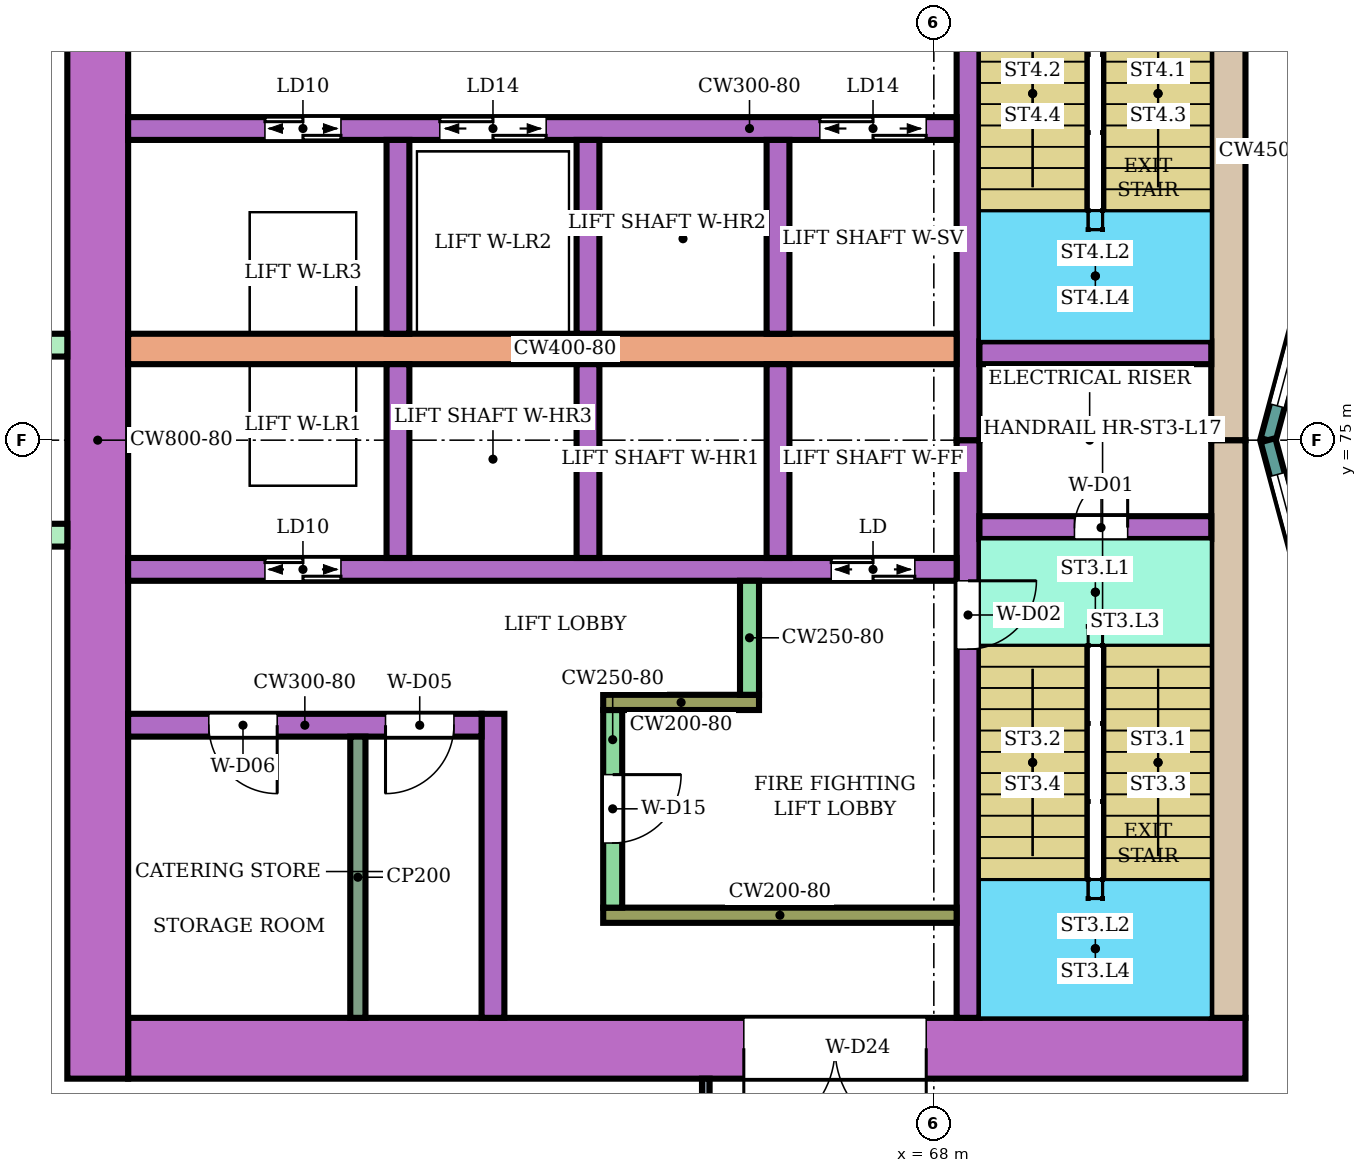
"""IFC4 building model, lengths in metres.
Left out: names, types, materials, properties, quantities, classifications, styles, units other than length and angle.
Written with IfcOpenShell. Run it as: python <this file> out.ifc"""

import sys

from ifc_helpers import new_model, si_unit, direction, frame, frame_2d, origin, place, context, subcontext, project, spatial, rectangle, extrude, element, fill, save


model = new_model("IFC4")
c1 = context("Model", 3, precision=1e-05, world=origin(), true_north=direction((0.0, 1.0)))
c2 = subcontext(c1, "Body", "Model", "MODEL_VIEW")
j1 = project(units=[si_unit("LENGTHUNIT", "METRE"), si_unit("PLANEANGLEUNIT", "RADIAN")], contexts=[c1])
p1 = place(None, origin())
s1 = spatial("IfcSite", under=j1, at=p1, CompositionType="ELEMENT")
p2 = place(p1, origin())
s2 = spatial("IfcBuilding", under=s1, at=p2, CompositionType="ELEMENT")
p3 = place(p2, frame((0.0, 0.0, 74.4)))
s3 = spatial("IfcBuildingStorey", under=s2, at=p3, CompositionType="ELEMENT", Elevation=74.4)
p4 = place(p3, frame((72.1, 67.0, 0.0), z_axis=(0.0, 0.0, 1.0), x_axis=(-1.0, 0.0, 0.0)))
e1 = element("IfcWall", 1, at=p4, inside=s3, PredefinedType="SHEAR", context=c2, shape_type="SweptSolid", body=[
    extrude(rectangle(XDim=14.7, YDim=0.8, at=frame_2d((7.35, 0.0))), origin(), (0.0, 0.0, 1.0), 7.68),
])
p5 = place(p4, frame((4.2, 0.0, 0.0)))
e2 = element("IfcOpeningElement", 2, at=p5, cuts=e1, PredefinedType="OPENING", context=c2, shape_type="SweptSolid", body=[
    extrude(rectangle(XDim=2.4, YDim=2.4, at=frame_2d((1.2, 1.2))), frame((0.0, 0.41, 0.0), z_axis=(0.0, -1.0, 0.0), x_axis=(1.0, 0.0, 0.0)), (0.0, 0.0, 1.0), 0.82),
])
for number, where, z_axis, x_axis in (
    (3, (71.875, 75.0, 0.0), (0.0, 0.0, 1.0), (0.0, -1.0, 0.0)),
    (4, (71.875, 82.6, 0.0), (0.0, 0.0, 1.0), (0.0, -1.0, 0.0)),
):
    element("IfcWall", number, at=place(p3, frame(where, z_axis=z_axis, x_axis=x_axis)), inside=s3, PredefinedType="SHEAR", context=c2, shape_type="SweptSolid", body=[
        extrude(rectangle(XDim=7.6, YDim=0.45, at=frame_2d((3.8, 0.0))), origin(), (0.0, 0.0, 1.0), 7.68),
    ])
p6 = place(p3, frame((57.0, 83.4, 0.0), z_axis=(0.0, 0.0, 1.0), x_axis=(0.0, -1.0, 0.0)))
e5 = element("IfcWall", 5, at=p6, inside=s3, PredefinedType="SHEAR", context=c2, shape_type="SweptSolid", body=[
    extrude(rectangle(XDim=16.8, YDim=0.8, at=frame_2d((8.4, 0.0))), origin(), (0.0, 0.0, 1.0), 7.68),
])
p7 = place(p3, frame((68.45, 75.0, 0.0), z_axis=(0.0, 0.0, 1.0), x_axis=(0.0, -1.0, 0.0)))
e6 = element("IfcWall", 6, at=p7, inside=s3, PredefinedType="SHEAR", context=c2, shape_type="SweptSolid", body=[
    extrude(rectangle(XDim=7.6, YDim=0.3, at=frame_2d((3.8, 0.0))), origin(), (0.0, 0.0, 1.0), 7.68),
])
p8 = place(p7, frame((1.85, 0.0, 0.0)))
e7 = element("IfcOpeningElement", 7, at=p8, cuts=e6, PredefinedType="OPENING", context=c2, shape_type="SweptSolid", body=[
    extrude(rectangle(XDim=0.9, YDim=2.1, at=frame_2d((0.45, 1.05))), frame((0.0, 0.16, 0.0), z_axis=(0.0, -1.0, 0.0), x_axis=(1.0, 0.0, 0.0)), (0.0, 0.0, 1.0), 0.32),
])
p9 = place(p3, frame((68.45, 82.6, 0.0), z_axis=(0.0, 0.0, 1.0), x_axis=(0.0, -1.0, 0.0)))
e8 = element("IfcWall", 8, at=p9, inside=s3, PredefinedType="SHEAR", context=c2, shape_type="SweptSolid", body=[
    extrude(rectangle(XDim=7.6, YDim=0.3, at=frame_2d((3.8, 0.0))), origin(), (0.0, 0.0, 1.0), 7.68),
])
p10 = place(p9, frame((0.25, 0.0, 0.0)))
e9 = element("IfcOpeningElement", 9, at=p10, cuts=e8, PredefinedType="OPENING", context=c2, shape_type="SweptSolid", body=[
    extrude(rectangle(XDim=0.9, YDim=2.1, at=frame_2d((0.45, 1.05))), frame((0.0, 0.16, 0.0), z_axis=(0.0, -1.0, 0.0), x_axis=(1.0, 0.0, 0.0)), (0.0, 0.0, 1.0), 0.32),
])
p11 = place(p3, frame((71.65, 73.85, 0.0), z_axis=(0.0, 0.0, 1.0), x_axis=(-1.0, 0.0, 0.0)))
e10 = element("IfcWall", 10, at=p11, inside=s3, PredefinedType="SHEAR", context=c2, shape_type="SweptSolid", body=[
    extrude(rectangle(XDim=3.05, YDim=0.3, at=frame_2d((1.525, 0.0))), origin(), (0.0, 0.0, 1.0), 7.68),
])
p12 = place(p11, frame((1.1, 0.0, 0.0)))
e11 = element("IfcOpeningElement", 11, at=p12, cuts=e10, PredefinedType="OPENING", context=c2, shape_type="SweptSolid", body=[
    extrude(rectangle(XDim=0.7, YDim=2.0, at=frame_2d((0.35, 1.0))), frame((0.0, 0.16, 0.0), z_axis=(0.0, -1.0, 0.0), x_axis=(1.0, 0.0, 0.0)), (0.0, 0.0, 1.0), 0.32),
])
p13 = place(p3, frame((71.65, 76.15, 0.0), z_axis=(0.0, 0.0, 1.0), x_axis=(-1.0, 0.0, 0.0)))
e12 = element("IfcWall", 12, at=p13, inside=s3, PredefinedType="SHEAR", context=c2, shape_type="SweptSolid", body=[
    extrude(rectangle(XDim=3.05, YDim=0.3, at=frame_2d((1.525, 0.0))), origin(), (0.0, 0.0, 1.0), 7.68),
])
p14 = place(p3, frame((68.3, 73.3, 0.0), z_axis=(0.0, 0.0, 1.0), x_axis=(-1.0, 0.0, 0.0)))
e13 = element("IfcWall", 13, at=p14, inside=s3, PredefinedType="SHEAR", context=c2, shape_type="SweptSolid", body=[
    extrude(rectangle(XDim=10.9, YDim=0.3, at=frame_2d((5.45, 0.0))), origin(), (0.0, 0.0, 1.0), 7.68),
])
p15 = place(p14, frame((0.55, 0.0, 0.0)))
e14 = element("IfcOpeningElement", 14, at=p15, cuts=e13, PredefinedType="OPENING", context=c2, shape_type="SweptSolid", body=[
    extrude(rectangle(XDim=1.1, YDim=2.1, at=frame_2d((0.55, 1.05))), frame((0.0, 0.16, 0.0), z_axis=(0.0, -1.0, 0.0), x_axis=(1.0, 0.0, 0.0)), (0.0, 0.0, 1.0), 0.32),
])
p16 = place(p14, frame((8.1, 0.0, 0.0)))
e15 = element("IfcOpeningElement", 15, at=p16, cuts=e13, PredefinedType="OPENING", context=c2, shape_type="SweptSolid", body=[
    extrude(rectangle(XDim=1.0, YDim=2.1, at=frame_2d((0.5, 1.05))), frame((0.0, 0.16, 0.0), z_axis=(0.0, -1.0, 0.0), x_axis=(1.0, 0.0, 0.0)), (0.0, 0.0, 1.0), 0.32),
])
p17 = place(p3, frame((68.3, 76.2, 0.0), z_axis=(0.0, 0.0, 1.0), x_axis=(-1.0, 0.0, 0.0)))
e16 = element("IfcWall", 16, at=p17, inside=s3, PredefinedType="SHEAR", context=c2, shape_type="SweptSolid", body=[
    extrude(rectangle(XDim=10.9, YDim=0.4, at=frame_2d((5.45, 0.0))), origin(), (0.0, 0.0, 1.0), 7.68),
])
p18 = place(p3, frame((68.3, 79.1, 0.0), z_axis=(0.0, 0.0, 1.0), x_axis=(-1.0, 0.0, 0.0)))
e17 = element("IfcWall", 17, at=p18, inside=s3, PredefinedType="SHEAR", context=c2, shape_type="SweptSolid", body=[
    extrude(rectangle(XDim=10.9, YDim=0.3, at=frame_2d((5.45, 0.0))), origin(), (0.0, 0.0, 1.0), 7.68),
])
p19 = place(p18, frame((0.4, 0.0, 0.0)))
e18 = element("IfcOpeningElement", 18, at=p19, cuts=e17, PredefinedType="OPENING", context=c2, shape_type="SweptSolid", body=[
    extrude(rectangle(XDim=1.4, YDim=2.1, at=frame_2d((0.7, 1.05))), frame((0.0, 0.16, 0.0), z_axis=(0.0, -1.0, 0.0), x_axis=(1.0, 0.0, 0.0)), (0.0, 0.0, 1.0), 0.32),
])
p20 = place(p18, frame((5.4, 0.0, 0.0)))
e19 = element("IfcOpeningElement", 19, at=p20, cuts=e17, PredefinedType="OPENING", context=c2, shape_type="SweptSolid", body=[
    extrude(rectangle(XDim=1.4, YDim=2.1, at=frame_2d((0.7, 1.05))), frame((0.0, 0.16, 0.0), z_axis=(0.0, -1.0, 0.0), x_axis=(1.0, 0.0, 0.0)), (0.0, 0.0, 1.0), 0.32),
])
p21 = place(p18, frame((8.1, 0.0, 0.0)))
e20 = element("IfcOpeningElement", 20, at=p21, cuts=e17, PredefinedType="OPENING", context=c2, shape_type="SweptSolid", body=[
    extrude(rectangle(XDim=1.0, YDim=2.1, at=frame_2d((0.5, 1.05))), frame((0.0, 0.16, 0.0), z_axis=(0.0, -1.0, 0.0), x_axis=(1.0, 0.0, 0.0)), (0.0, 0.0, 1.0), 0.32),
])
for number, where, z_axis, x_axis in (
    (21, (65.95, 76.0, 0.0), (0.0, 0.0, 1.0), (0.0, -1.0, 0.0)),
    (22, (63.45, 76.0, 0.0), (0.0, 0.0, 1.0), (0.0, -1.0, 0.0)),
    (23, (60.95, 76.0, 0.0), (0.0, 0.0, 1.0), (0.0, -1.0, 0.0)),
    (24, (65.95, 78.95, 0.0), (0.0, 0.0, 1.0), (0.0, -1.0, 0.0)),
    (25, (63.45, 78.95, 0.0), (0.0, 0.0, 1.0), (0.0, -1.0, 0.0)),
    (26, (60.95, 78.95, 0.0), (0.0, 0.0, 1.0), (0.0, -1.0, 0.0)),
):
    element("IfcWall", number, at=place(p3, frame(where, z_axis=z_axis, x_axis=x_axis)), inside=s3, PredefinedType="SHEAR", context=c2, shape_type="SweptSolid", body=[
        extrude(rectangle(XDim=2.55, YDim=0.3, at=frame_2d((1.275, 0.0))), origin(), (0.0, 0.0, 1.0), 7.68),
    ])
p22 = place(p3, frame((68.3, 68.75, 0.0), z_axis=(0.0, 0.0, 1.0), x_axis=(-1.0, 0.0, 0.0)))
e27 = element("IfcWall", 27, at=p22, inside=s3, PredefinedType="SHEAR", context=c2, shape_type="SweptSolid", body=[
    extrude(rectangle(XDim=4.65, YDim=0.2, at=frame_2d((2.325, 0.0))), origin(), (0.0, 0.0, 1.0), 7.68),
])
p23 = place(p3, frame((63.775, 71.45, 0.0), z_axis=(0.0, 0.0, 1.0), x_axis=(0.0, -1.0, 0.0)))
e28 = element("IfcWall", 28, at=p23, inside=s3, PredefinedType="SHEAR", context=c2, shape_type="SweptSolid", body=[
    extrude(rectangle(XDim=2.6, YDim=0.25, at=frame_2d((1.3, 0.0))), origin(), (0.0, 0.0, 1.0), 7.68),
])
p24 = place(p23, frame((0.85, 0.0, 0.0)))
e29 = element("IfcOpeningElement", 29, at=p24, cuts=e28, PredefinedType="OPENING", context=c2, shape_type="SweptSolid", body=[
    extrude(rectangle(XDim=0.9, YDim=2.1, at=frame_2d((0.45, 1.05))), frame((0.0, 0.135, 0.0), z_axis=(0.0, -1.0, 0.0), x_axis=(1.0, 0.0, 0.0)), (0.0, 0.0, 1.0), 0.27),
])
p25 = place(p3, frame((65.7, 71.55, 0.0), z_axis=(0.0, 0.0, 1.0), x_axis=(-1.0, 0.0, 0.0)))
e30 = element("IfcWall", 30, at=p25, inside=s3, PredefinedType="SHEAR", context=c2, shape_type="SweptSolid", body=[
    extrude(rectangle(XDim=2.05, YDim=0.2, at=frame_2d((1.025, 0.0))), origin(), (0.0, 0.0, 1.0), 7.68),
])
p26 = place(p3, frame((65.575, 73.15, 0.0), z_axis=(0.0, 0.0, 1.0), x_axis=(0.0, -1.0, 0.0)))
e31 = element("IfcWall", 31, at=p26, inside=s3, PredefinedType="SHEAR", context=c2, shape_type="SweptSolid", body=[
    extrude(rectangle(XDim=1.5, YDim=0.25, at=frame_2d((0.75, 0.0))), origin(), (0.0, 0.0, 1.0), 7.68),
])
p27 = place(p3, frame((62.2, 71.4, 0.0), z_axis=(0.0, 0.0, 1.0), x_axis=(0.0, -1.0, 0.0)))
e32 = element("IfcWall", 32, at=p27, inside=s3, PredefinedType="SHEAR", context=c2, shape_type="SweptSolid", body=[
    extrude(rectangle(XDim=4.0, YDim=0.3, at=frame_2d((2.0, 0.0))), origin(), (0.0, 0.0, 1.0), 7.68),
])
p28 = place(p3, frame((62.05, 71.25, 0.0), z_axis=(0.0, 0.0, 1.0), x_axis=(-1.0, 0.0, 0.0)))
e33 = element("IfcWall", 33, at=p28, inside=s3, PredefinedType="SHEAR", context=c2, shape_type="SweptSolid", body=[
    extrude(rectangle(XDim=4.65, YDim=0.3, at=frame_2d((2.325, 0.0))), origin(), (0.0, 0.0, 1.0), 7.68),
])
p29 = place(p28, frame((0.364, 0.0, 0.0)))
e34 = element("IfcOpeningElement", 34, at=p29, cuts=e33, PredefinedType="OPENING", context=c2, shape_type="SweptSolid", body=[
    extrude(rectangle(XDim=0.9, YDim=2.1, at=frame_2d((0.45, 1.05))), frame((0.0, 0.16, 0.0), z_axis=(0.0, -1.0, 0.0), x_axis=(1.0, 0.0, 0.0)), (0.0, 0.0, 1.0), 0.32),
])
p30 = place(p28, frame((2.689, 0.0, 0.0)))
e35 = element("IfcOpeningElement", 35, at=p30, cuts=e33, PredefinedType="OPENING", context=c2, shape_type="SweptSolid", body=[
    extrude(rectangle(XDim=0.9, YDim=2.1, at=frame_2d((0.45, 1.05))), frame((0.0, 0.16, 0.0), z_axis=(0.0, -1.0, 0.0), x_axis=(1.0, 0.0, 0.0)), (0.0, 0.0, 1.0), 0.32),
])
for number, where, z_axis, x_axis in (
    (36, (56.6, 76.25, 0.0), (0.0, 0.0, 1.0), (-1.0, 0.0, 0.0)),
    (37, (56.6, 73.75, 0.0), (0.0, 0.0, 1.0), (-1.0, 0.0, 0.0)),
):
    element("IfcWall", number, at=place(p3, frame(where, z_axis=z_axis, x_axis=x_axis)), inside=s3, PredefinedType="NOTDEFINED", context=c2, shape_type="SweptSolid", body=[
        extrude(rectangle(XDim=2.416, YDim=0.3, at=frame_2d((1.208, 0.0))), origin(), (0.0, 0.0, 1.0), 8.0),
    ])
p31 = place(p3, frame((73.415, 78.802, 0.0), z_axis=(0.0, 0.0, 1.0), x_axis=(-0.258789828301, -0.965933654434, 0.0)))
e38 = element("IfcWall", 38, at=p31, inside=s3, PredefinedType="NOTDEFINED", context=c2, shape_type="SweptSolid", body=[
    extrude(rectangle(XDim=3.936, YDim=0.2, at=frame_2d((1.968, 0.0))), origin(), (0.0, 0.0, 1.0), 8.0),
])
p32 = place(p31, frame((0.468, 0.0, 0.9)))
e39 = element("IfcOpeningElement", 39, at=p32, cuts=e38, PredefinedType="OPENING", context=c2, shape_type="SweptSolid", body=[
    extrude(rectangle(XDim=3.0, YDim=2.3, at=frame_2d((1.5, 1.15))), frame((0.0, 0.11, 0.0), z_axis=(0.0, -1.0, 0.0), x_axis=(1.0, 0.0, 0.0)), (0.0, 0.0, 1.0), 0.22),
])
p33 = place(p3, frame((72.396, 75.0, 0.0), z_axis=(0.0, 0.0, 1.0), x_axis=(0.258789828301, -0.965933654434, 0.0)))
e40 = element("IfcWall", 40, at=p33, inside=s3, PredefinedType="NOTDEFINED", context=c2, shape_type="SweptSolid", body=[
    extrude(rectangle(XDim=3.936, YDim=0.2, at=frame_2d((1.968, 0.0))), origin(), (0.0, 0.0, 1.0), 8.0),
])
p34 = place(p33, frame((0.468, 0.0, 0.9)))
e41 = element("IfcOpeningElement", 41, at=p34, cuts=e40, PredefinedType="OPENING", context=c2, shape_type="SweptSolid", body=[
    extrude(rectangle(XDim=3.0, YDim=2.3, at=frame_2d((1.5, 1.15))), frame((0.0, 0.11, 0.0), z_axis=(0.0, -1.0, 0.0), x_axis=(1.0, 0.0, 0.0)), (0.0, 0.0, 1.0), 0.22),
])
p35 = place(p3, frame((75.475, 67.162, 0.0), z_axis=(0.0, 0.0, 1.0), x_axis=(-0.50001663867, -0.86601579723, 0.0)))
e42 = element("IfcWall", 42, at=p35, inside=s3, PredefinedType="NOTDEFINED", context=c2, shape_type="SweptSolid", body=[
    extrude(rectangle(XDim=7.95, YDim=0.2, at=frame_2d((3.975, 0.0))), origin(), (0.0, 0.0, 1.0), 8.0),
])
p36 = place(p35, frame((1.0, 0.0, 0.3)))
e43 = element("IfcOpeningElement", 43, at=p36, cuts=e42, PredefinedType="OPENING", context=c2, shape_type="SweptSolid", body=[
    extrude(rectangle(XDim=2.4, YDim=3.6, at=frame_2d((1.2, 1.8))), frame((0.0, 0.11, 0.0), z_axis=(0.0, -1.0, 0.0), x_axis=(1.0, 0.0, 0.0)), (0.0, 0.0, 1.0), 0.22),
])
p37 = place(p35, frame((3.85, 0.0, 0.0)))
e44 = element("IfcOpeningElement", 44, at=p37, cuts=e42, PredefinedType="OPENING", context=c2, shape_type="SweptSolid", body=[
    extrude(rectangle(XDim=1.8, YDim=2.4, at=frame_2d((0.9, 1.2))), frame((0.0, 0.11, 0.0), z_axis=(0.0, -1.0, 0.0), x_axis=(1.0, 0.0, 0.0)), (0.0, 0.0, 1.0), 0.22),
])
p38 = place(p35, frame((6.1, 0.0, 0.3)))
e45 = element("IfcOpeningElement", 45, at=p38, cuts=e42, PredefinedType="OPENING", context=c2, shape_type="SweptSolid", body=[
    extrude(rectangle(XDim=1.6, YDim=3.6, at=frame_2d((0.8, 1.8))), frame((0.0, 0.11, 0.0), z_axis=(0.0, -1.0, 0.0), x_axis=(1.0, 0.0, 0.0)), (0.0, 0.0, 1.0), 0.22),
])
p39 = place(p3, frame((65.0, 54.27, 0.0), z_axis=(0.0, 0.0, 1.0), x_axis=(0.0, 1.0, 0.0)))
e46 = element("IfcWall", 46, at=p39, inside=s3, PredefinedType="PARTITIONING", context=c2, shape_type="SweptSolid", body=[
    extrude(rectangle(XDim=12.33, YDim=0.1, at=frame_2d((6.165, 0.0))), origin(), (0.0, 0.0, 1.0), 7.55),
])
p40 = place(p39, frame((6.309, 0.0, 0.0)))
e47 = element("IfcOpeningElement", 47, at=p40, cuts=e46, PredefinedType="OPENING", context=c2, shape_type="SweptSolid", body=[
    extrude(rectangle(XDim=1.8, YDim=2.1, at=frame_2d((0.9, 1.05))), frame((0.0, 0.06, 0.0), z_axis=(0.0, -1.0, 0.0), x_axis=(1.0, 0.0, 0.0)), (0.0, 0.0, 1.0), 0.12),
])
p41 = place(p3, frame((60.423, 71.1, 0.0), z_axis=(0.0, 0.0, 1.0), x_axis=(0.0, -1.0, 0.0)))
e48 = element("IfcWall", 48, at=p41, inside=s3, PredefinedType="PARTITIONING", context=c2, shape_type="SweptSolid", body=[
    extrude(rectangle(XDim=3.7, YDim=0.2, at=frame_2d((1.85, 0.0))), origin(), (0.0, 0.0, 1.0), 7.68),
])
p42 = place(p32, origin())
e49 = element("IfcWindow", 49, at=p42, inside=s3, PartitioningType="SINGLE_PANEL", PredefinedType="WINDOW", context=c2, shape_type="SweptSolid", body=[
    extrude(rectangle(XDim=3.0, YDim=2.3, at=frame_2d((1.5, 1.15))), frame((0.0, 0.03, 0.0), z_axis=(0.0, -1.0, 0.0), x_axis=(1.0, 0.0, 0.0)), (0.0, 0.0, 1.0), 0.06),
])
fill(e39, e49)
p43 = place(p34, origin())
e50 = element("IfcWindow", 50, at=p43, inside=s3, PartitioningType="SINGLE_PANEL", PredefinedType="WINDOW", context=c2, shape_type="SweptSolid", body=[
    extrude(rectangle(XDim=3.0, YDim=2.3, at=frame_2d((1.5, 1.15))), frame((0.0, 0.03, 0.0), z_axis=(0.0, -1.0, 0.0), x_axis=(1.0, 0.0, 0.0)), (0.0, 0.0, 1.0), 0.06),
])
fill(e41, e50)
p44 = place(p12, frame((0.7, 0.0, 0.0), z_axis=(0.0, 0.0, 1.0), x_axis=(-1.0, 0.0, 0.0)))
e51 = element("IfcDoor", 51, at=p44, inside=s3, OperationType="SINGLE_SWING_RIGHT", PredefinedType="DOOR", context=c2, shape_type="SweptSolid", body=[
    extrude(rectangle(XDim=0.7, YDim=2.0, at=frame_2d((0.35, 1.0))), frame((0.0, 0.025, 0.0), z_axis=(0.0, -1.0, 0.0), x_axis=(1.0, 0.0, 0.0)), (0.0, 0.0, 1.0), 0.05),
])
fill(e11, e51)
p45 = place(p8, origin())
e52 = element("IfcDoor", 52, at=p45, inside=s3, OperationType="SINGLE_SWING_LEFT", PredefinedType="DOOR", context=c2, shape_type="SweptSolid", body=[
    extrude(rectangle(XDim=0.9, YDim=2.1, at=frame_2d((0.45, 1.05))), frame((0.0, 0.025, 0.0), z_axis=(0.0, -1.0, 0.0), x_axis=(1.0, 0.0, 0.0)), (0.0, 0.0, 1.0), 0.05),
])
fill(e7, e52)
p46 = place(p15, origin())
e53 = element("IfcDoor", 53, at=p46, inside=s3, OperationType="DOUBLE_DOOR_SLIDING", PredefinedType="DOOR", context=c2, shape_type="SweptSolid", body=[
    extrude(rectangle(XDim=1.1, YDim=2.1, at=frame_2d((0.55, 1.05))), frame((0.0, 0.025, 0.0), z_axis=(0.0, -1.0, 0.0), x_axis=(1.0, 0.0, 0.0)), (0.0, 0.0, 1.0), 0.05),
])
fill(e14, e53)
p47 = place(p16, origin())
e54 = element("IfcDoor", 54, at=p47, inside=s3, OperationType="DOUBLE_DOOR_SLIDING", PredefinedType="DOOR", context=c2, shape_type="SweptSolid", body=[
    extrude(rectangle(XDim=1.0, YDim=2.1, at=frame_2d((0.5, 1.05))), frame((0.0, 0.025, 0.0), z_axis=(0.0, -1.0, 0.0), x_axis=(1.0, 0.0, 0.0)), (0.0, 0.0, 1.0), 0.05),
])
fill(e15, e54)
p48 = place(p19, origin())
e55 = element("IfcDoor", 55, at=p48, inside=s3, OperationType="DOUBLE_DOOR_SLIDING", PredefinedType="DOOR", context=c2, shape_type="SweptSolid", body=[
    extrude(rectangle(XDim=1.4, YDim=2.1, at=frame_2d((0.7, 1.05))), frame((0.0, 0.025, 0.0), z_axis=(0.0, -1.0, 0.0), x_axis=(1.0, 0.0, 0.0)), (0.0, 0.0, 1.0), 0.05),
])
fill(e18, e55)
p49 = place(p20, origin())
e56 = element("IfcDoor", 56, at=p49, inside=s3, OperationType="DOUBLE_DOOR_SLIDING", PredefinedType="DOOR", context=c2, shape_type="SweptSolid", body=[
    extrude(rectangle(XDim=1.4, YDim=2.1, at=frame_2d((0.7, 1.05))), frame((0.0, 0.025, 0.0), z_axis=(0.0, -1.0, 0.0), x_axis=(1.0, 0.0, 0.0)), (0.0, 0.0, 1.0), 0.05),
])
fill(e19, e56)
p50 = place(p21, origin())
e57 = element("IfcDoor", 57, at=p50, inside=s3, OperationType="DOUBLE_DOOR_SLIDING", PredefinedType="DOOR", context=c2, shape_type="SweptSolid", body=[
    extrude(rectangle(XDim=1.0, YDim=2.1, at=frame_2d((0.5, 1.05))), frame((0.0, 0.025, 0.0), z_axis=(0.0, -1.0, 0.0), x_axis=(1.0, 0.0, 0.0)), (0.0, 0.0, 1.0), 0.05),
])
fill(e20, e57)
p51 = place(p24, origin())
e58 = element("IfcDoor", 58, at=p51, inside=s3, OperationType="SINGLE_SWING_LEFT", PredefinedType="DOOR", context=c2, shape_type="SweptSolid", body=[
    extrude(rectangle(XDim=0.9, YDim=2.1, at=frame_2d((0.45, 1.05))), frame((0.0, 0.025, 0.0), z_axis=(0.0, -1.0, 0.0), x_axis=(1.0, 0.0, 0.0)), (0.0, 0.0, 1.0), 0.05),
])
fill(e29, e58)
p52 = place(p29, origin())
e59 = element("IfcDoor", 59, at=p52, inside=s3, OperationType="SINGLE_SWING_RIGHT", PredefinedType="DOOR", context=c2, shape_type="SweptSolid", body=[
    extrude(rectangle(XDim=0.9, YDim=2.1, at=frame_2d((0.45, 1.05))), frame((0.0, 0.025, 0.0), z_axis=(0.0, -1.0, 0.0), x_axis=(1.0, 0.0, 0.0)), (0.0, 0.0, 1.0), 0.05),
])
fill(e34, e59)
p53 = place(p30, origin())
e60 = element("IfcDoor", 60, at=p53, inside=s3, OperationType="SINGLE_SWING_LEFT", PredefinedType="DOOR", context=c2, shape_type="SweptSolid", body=[
    extrude(rectangle(XDim=0.9, YDim=2.1, at=frame_2d((0.45, 1.05))), frame((0.0, 0.025, 0.0), z_axis=(0.0, -1.0, 0.0), x_axis=(1.0, 0.0, 0.0)), (0.0, 0.0, 1.0), 0.05),
])
fill(e35, e60)
p54 = place(p5, origin())
e61 = element("IfcDoor", 61, at=p54, inside=s3, OperationType="DOUBLE_DOOR_SINGLE_SWING", PredefinedType="DOOR", context=c2, shape_type="SweptSolid", body=[
    extrude(rectangle(XDim=2.4, YDim=2.4, at=frame_2d((1.2, 1.2))), frame((0.0, 0.025, 0.0), z_axis=(0.0, -1.0, 0.0), x_axis=(1.0, 0.0, 0.0)), (0.0, 0.0, 1.0), 0.05),
])
fill(e2, e61)
save(model, sys.argv[1])
